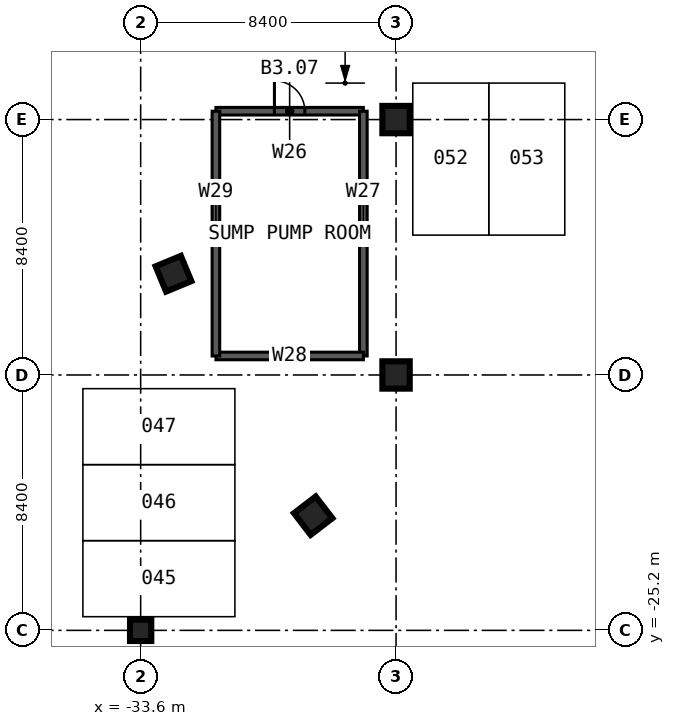
"""IFC4 building model, lengths in metres.
Left out: names, types, materials, properties, quantities, classifications, styles, units other than length and angle.
Written with IfcOpenShell. Run it as: python <this file> out.ifc"""

import sys

from ifc_helpers import new_model, si_unit, direction, frame, frame_2d, origin, origin_2d, place, context, subcontext, project, spatial, rectangle, extrude, element, fill, save


model = new_model("IFC4")
c1 = context("Model", 3, precision=1e-05, world=origin(), true_north=direction((0.0, 1.0)))
c2 = subcontext(c1, "Body", "Model", "MODEL_VIEW")
j1 = project(units=[si_unit("LENGTHUNIT", "METRE"), si_unit("PLANEANGLEUNIT", "RADIAN")], contexts=[c1])
p1 = place(None, origin())
s1 = spatial("IfcSite", under=j1, at=p1, CompositionType="ELEMENT")
p2 = place(p1, origin())
s2 = spatial("IfcBuilding", under=s1, at=p2, CompositionType="ELEMENT")
p3 = place(p2, frame((0.0, 0.0, -13.5)))
s3 = spatial("IfcBuildingStorey", under=s2, at=p3, CompositionType="ELEMENT", Elevation=-13.5)
for number, where, z_axis, x_axis in (
    (1, (-25.2, -16.8, 0.0), (0.0, 0.0, 1.0), (1.0, 0.0, 0.0)),
    (2, (-25.2, -8.4, 0.0), (0.0, 0.0, 1.0), (1.0, 0.0, 0.0)),
):
    element("IfcColumn", number, at=place(p3, frame(where, z_axis=z_axis, x_axis=x_axis)), inside=s3, PredefinedType="COLUMN", context=c2, shape_type="SweptSolid", body=[
        extrude(rectangle(XDim=0.9, YDim=0.9, at=origin_2d()), origin(), (0.0, 0.0, 1.0), 4.5),
    ])
p4 = place(p3, frame((-33.6, -25.2, 0.0), z_axis=(0.0, 0.0, 1.0), x_axis=(1.0, 0.0, 0.0)))
e3 = element("IfcColumn", 3, at=p4, inside=s3, PredefinedType="COLUMN", context=c2, shape_type="SweptSolid", body=[
    extrude(rectangle(XDim=0.7, YDim=0.7, at=origin_2d()), origin(), (0.0, 0.0, 1.0), 4.5),
])
for number, where, z_axis, x_axis in (
    (4, (-32.521, -13.47, 0.0), (0.0, 0.0, 1.0), (-0.924, -0.383, 0.0)),
    (5, (-27.926, -21.428, 0.0), (0.0, 0.0, 1.0), (-0.793, -0.609, 0.0)),
):
    element("IfcColumn", number, at=place(p3, frame(where, z_axis=z_axis, x_axis=x_axis)), inside=s3, PredefinedType="COLUMN", context=c2, shape_type="SweptSolid", body=[
        extrude(rectangle(XDim=0.9, YDim=0.9, at=origin_2d()), origin(), (0.0, 0.0, 1.0), 4.5),
    ])
p5 = place(p3, frame((-31.125, -8.125, 0.0), z_axis=(0.0, 0.0, 1.0), x_axis=(1.0, 0.0, 0.0)))
e6 = element("IfcWall", 6, at=p5, inside=s3, PredefinedType="SOLIDWALL", context=c2, shape_type="SweptSolid", body=[
    extrude(rectangle(XDim=4.85, YDim=0.25, at=frame_2d((2.425, 0.0))), origin(), (0.0, 0.0, 1.0), 4.5),
])
p6 = place(p5, frame((1.925, 0.0, 0.0)))
e7 = element("IfcOpeningElement", 7, at=p6, cuts=e6, PredefinedType="OPENING", context=c2, shape_type="SweptSolid", body=[
    extrude(rectangle(XDim=1.0, YDim=2.2, at=frame_2d((0.5, 1.1))), frame((0.0, 0.135, 0.0), z_axis=(0.0, -1.0, 0.0), x_axis=(1.0, 0.0, 0.0)), (0.0, 0.0, 1.0), 0.27),
])
p7 = place(p3, frame((-26.275, -8.125, 0.0), z_axis=(0.0, 0.0, 1.0), x_axis=(0.0, -1.0, 0.0)))
e8 = element("IfcWall", 8, at=p7, inside=s3, PredefinedType="SOLIDWALL", context=c2, shape_type="SweptSolid", body=[
    extrude(rectangle(XDim=8.05, YDim=0.25, at=frame_2d((4.025, 0.0))), origin(), (0.0, 0.0, 1.0), 4.5),
])
p8 = place(p3, frame((-26.275, -16.175, 0.0), z_axis=(0.0, 0.0, 1.0), x_axis=(-1.0, 0.0, 0.0)))
e9 = element("IfcWall", 9, at=p8, inside=s3, PredefinedType="SOLIDWALL", context=c2, shape_type="SweptSolid", body=[
    extrude(rectangle(XDim=4.85, YDim=0.25, at=frame_2d((2.425, 0.0))), origin(), (0.0, 0.0, 1.0), 4.5),
])
p9 = place(p3, frame((-31.125, -16.175, 0.0), z_axis=(0.0, 0.0, 1.0), x_axis=(0.0, 1.0, 0.0)))
e10 = element("IfcWall", 10, at=p9, inside=s3, PredefinedType="SOLIDWALL", context=c2, shape_type="SweptSolid", body=[
    extrude(rectangle(XDim=8.05, YDim=0.25, at=frame_2d((4.025, 0.0))), origin(), (0.0, 0.0, 1.0), 4.5),
])
p10 = place(p6, origin())
e11 = element("IfcDoor", 11, at=p10, inside=s3, OperationType="SINGLE_SWING_LEFT", PredefinedType="DOOR", context=c2, shape_type="SweptSolid", body=[
    extrude(rectangle(XDim=1.0, YDim=2.2, at=frame_2d((0.5, 1.1))), frame((0.0, 0.025, 0.0), z_axis=(0.0, -1.0, 0.0), x_axis=(1.0, 0.0, 0.0)), (0.0, 0.0, 1.0), 0.05),
])
fill(e7, e11)
save(model, sys.argv[1])
